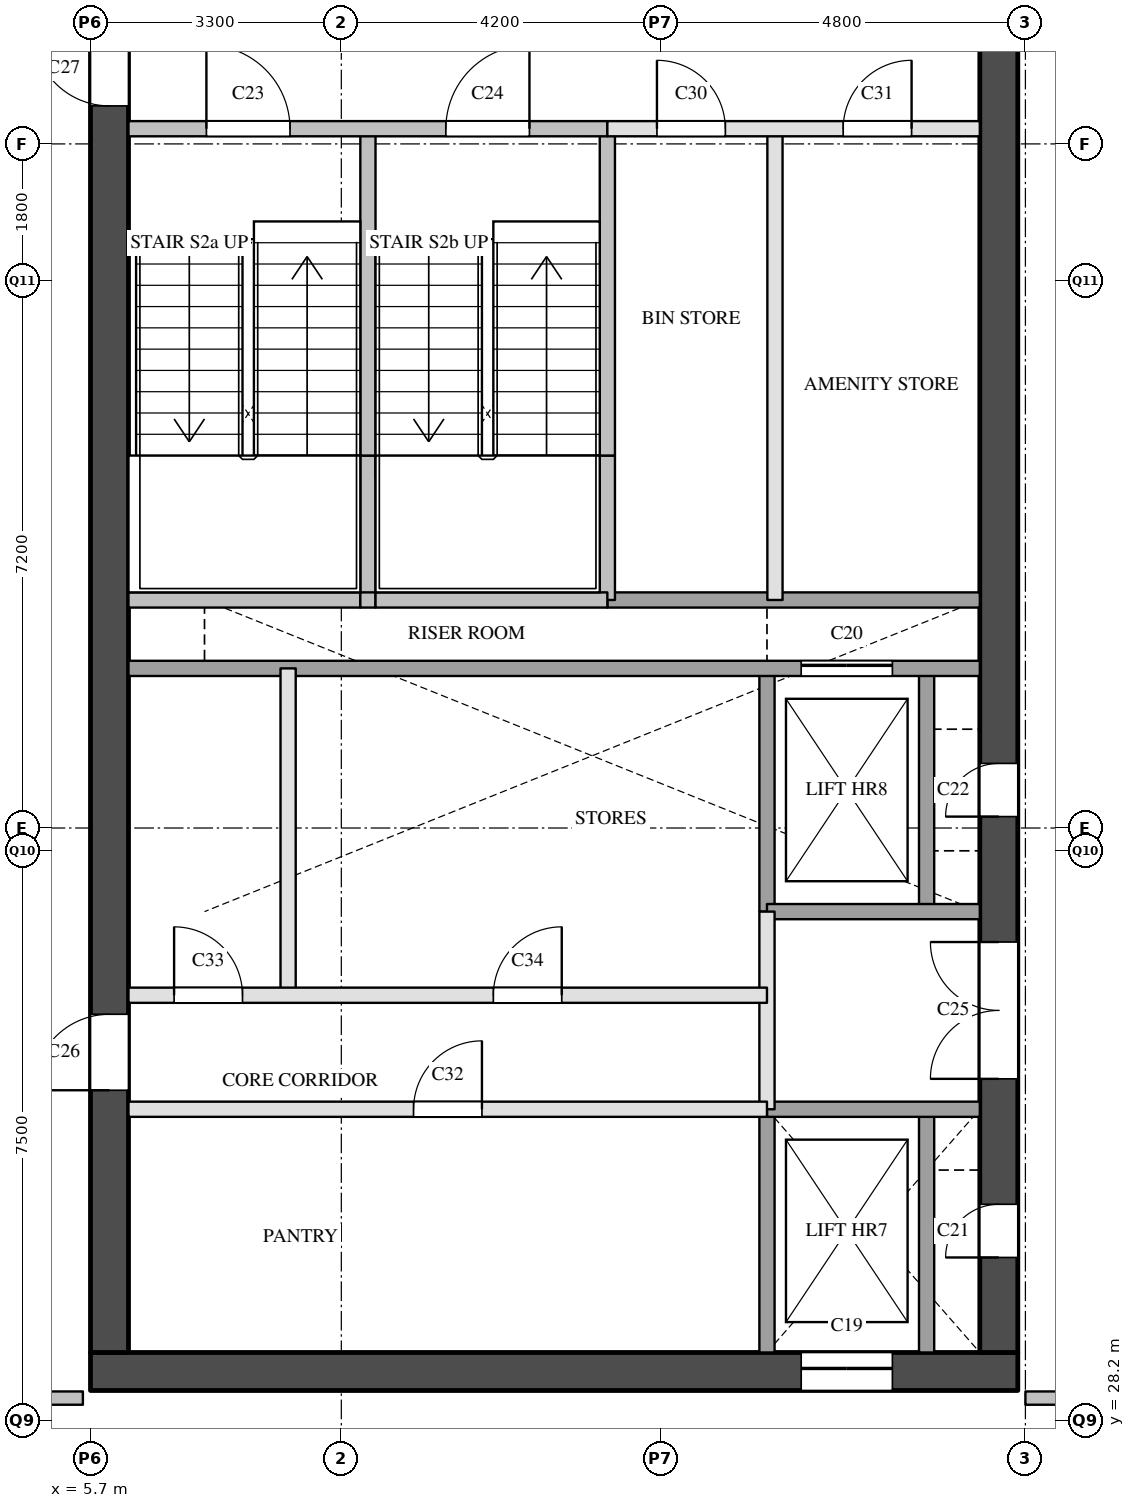
"""IFC4 building model, lengths in metres.
Left out: names, types, materials, properties, quantities, classifications, styles, units other than length and angle.
Written with IfcOpenShell. Run it as: python <this file> out.ifc"""

import sys

from ifc_helpers import new_model, si_unit, direction, frame, frame_2d, origin, place, context, subcontext, project, spatial, rectangle, extrude, element, fill, save


model = new_model("IFC4")
c1 = context("Model", 3, precision=1e-05, world=origin(), true_north=direction((0.0, 1.0)))
c2 = subcontext(c1, "Body", "Model", "MODEL_VIEW")
j1 = project(units=[si_unit("LENGTHUNIT", "METRE"), si_unit("PLANEANGLEUNIT", "RADIAN")], contexts=[c1])
p1 = place(None, origin())
s1 = spatial("IfcSite", under=j1, at=p1, CompositionType="ELEMENT")
p2 = place(p1, origin())
s2 = spatial("IfcBuilding", under=s1, at=p2, CompositionType="ELEMENT")
p3 = place(p2, frame((0.0, 0.0, 173.9)))
s3 = spatial("IfcBuildingStorey", under=s2, at=p3, CompositionType="ELEMENT", Elevation=173.9)
p4 = place(p3, frame((5.7, 28.85, 0.0), z_axis=(0.0, 0.0, 1.0), x_axis=(1.0, 0.0, 0.0)))
e1 = element("IfcWall", 1, at=p4, inside=s3, PredefinedType="SHEAR", context=c2, shape_type="SweptSolid", body=[
    extrude(rectangle(XDim=12.2, YDim=0.5, at=frame_2d((6.1, 0.0))), origin(), (0.0, 0.0, 1.0), 3.6),
])
p5 = place(p4, frame((9.35, 0.0, 0.0)))
e2 = element("IfcOpeningElement", 2, at=p5, cuts=e1, PredefinedType="OPENING", context=c2, shape_type="SweptSolid", body=[
    extrude(rectangle(XDim=1.2, YDim=2.1, at=frame_2d((0.6, 1.05))), frame((0.0, 0.26, 0.0), z_axis=(0.0, -1.0, 0.0), x_axis=(1.0, 0.0, 0.0)), (0.0, 0.0, 1.0), 0.52),
])
p6 = place(p3, frame((5.95, 29.1, 0.0), z_axis=(0.0, 0.0, 1.0), x_axis=(0.0, 1.0, 0.0)))
e3 = element("IfcWall", 3, at=p6, inside=s3, PredefinedType="SHEAR", context=c2, shape_type="SweptSolid", body=[
    extrude(rectangle(XDim=20.3, YDim=0.5, at=frame_2d((10.15, 0.0))), origin(), (0.0, 0.0, 1.0), 3.6),
])
p7 = place(p6, frame((3.45, 0.0, 0.0)))
e4 = element("IfcOpeningElement", 4, at=p7, cuts=e3, PredefinedType="OPENING", context=c2, shape_type="SweptSolid", body=[
    extrude(rectangle(XDim=1.0, YDim=2.1, at=frame_2d((0.5, 1.05))), frame((0.0, 0.26, 0.0), z_axis=(0.0, -1.0, 0.0), x_axis=(1.0, 0.0, 0.0)), (0.0, 0.0, 1.0), 0.52),
])
p8 = place(p6, frame((16.4, 0.0, 0.0)))
e5 = element("IfcOpeningElement", 5, at=p8, cuts=e3, PredefinedType="OPENING", context=c2, shape_type="SweptSolid", body=[
    extrude(rectangle(XDim=1.0, YDim=2.1, at=frame_2d((0.5, 1.05))), frame((0.0, 0.26, 0.0), z_axis=(0.0, -1.0, 0.0), x_axis=(1.0, 0.0, 0.0)), (0.0, 0.0, 1.0), 0.52),
])
p9 = place(p3, frame((17.65, 29.1, 0.0), z_axis=(0.0, 0.0, 1.0), x_axis=(0.0, 1.0, 0.0)))
e6 = element("IfcWall", 6, at=p9, inside=s3, PredefinedType="SHEAR", context=c2, shape_type="SweptSolid", body=[
    extrude(rectangle(XDim=20.3, YDim=0.5, at=frame_2d((10.15, 0.0))), origin(), (0.0, 0.0, 1.0), 3.6),
])
p10 = place(p9, frame((1.25, 0.0, 0.0)))
e7 = element("IfcOpeningElement", 7, at=p10, cuts=e6, PredefinedType="OPENING", context=c2, shape_type="SweptSolid", body=[
    extrude(rectangle(XDim=0.7, YDim=2.1, at=frame_2d((0.35, 1.05))), frame((0.0, 0.26, 0.0), z_axis=(0.0, -1.0, 0.0), x_axis=(1.0, 0.0, 0.0)), (0.0, 0.0, 1.0), 0.52),
])
p11 = place(p9, frame((7.05, 0.0, 0.0)))
e8 = element("IfcOpeningElement", 8, at=p11, cuts=e6, PredefinedType="OPENING", context=c2, shape_type="SweptSolid", body=[
    extrude(rectangle(XDim=0.7, YDim=2.1, at=frame_2d((0.35, 1.05))), frame((0.0, 0.26, 0.0), z_axis=(0.0, -1.0, 0.0), x_axis=(1.0, 0.0, 0.0)), (0.0, 0.0, 1.0), 0.52),
])
p12 = place(p9, frame((3.6, 0.0, 0.0)))
e9 = element("IfcOpeningElement", 9, at=p12, cuts=e6, PredefinedType="OPENING", context=c2, shape_type="SweptSolid", body=[
    extrude(rectangle(XDim=1.8, YDim=2.1, at=frame_2d((0.9, 1.05))), frame((0.0, 0.26, 0.0), z_axis=(0.0, -1.0, 0.0), x_axis=(1.0, 0.0, 0.0)), (0.0, 0.0, 1.0), 0.52),
])
p13 = place(p3, frame((8.3, 33.8, 0.0), z_axis=(0.0, 0.0, 1.0), x_axis=(0.0, 1.0, 0.0)))
e10 = element("IfcWall", 10, at=p13, inside=s3, PredefinedType="PARTITIONING", context=c2, shape_type="SweptSolid", body=[
    extrude(rectangle(XDim=4.3, YDim=0.2, at=frame_2d((2.15, 0.0))), origin(), (0.0, 0.0, 1.0), 3.6),
])
p14 = place(p3, frame((9.35, 39.0, 0.0), z_axis=(0.0, 0.0, 1.0), x_axis=(0.0, 1.0, 0.0)))
e11 = element("IfcWall", 11, at=p14, inside=s3, PredefinedType="SOLIDWALL", context=c2, shape_type="SweptSolid", body=[
    extrude(rectangle(XDim=1.9, YDim=0.2, at=frame_2d((0.95, 0.0))), origin(), (0.0, 0.0, 1.0), 3.6),
])
p15 = place(p3, frame((9.35, 40.9, 0.0), z_axis=(0.0, 0.0, 1.0), x_axis=(0.0, 1.0, 0.0)))
e12 = element("IfcWall", 12, at=p15, inside=s3, PredefinedType="SOLIDWALL", context=c2, shape_type="SweptSolid", body=[
    extrude(rectangle(XDim=4.3, YDim=0.2, at=frame_2d((2.15, 0.0))), origin(), (0.0, 0.0, 1.0), 3.6),
])
p16 = place(p3, frame((12.5, 39.0, 0.0), z_axis=(0.0, 0.0, 1.0), x_axis=(0.0, 1.0, 0.0)))
e13 = element("IfcWall", 13, at=p16, inside=s3, PredefinedType="SOLIDWALL", context=c2, shape_type="SweptSolid", body=[
    extrude(rectangle(XDim=1.9, YDim=0.2, at=frame_2d((0.95, 0.0))), origin(), (0.0, 0.0, 1.0), 3.6),
])
p17 = place(p3, frame((12.5, 40.9, 0.0), z_axis=(0.0, 0.0, 1.0), x_axis=(0.0, 1.0, 0.0)))
e14 = element("IfcWall", 14, at=p17, inside=s3, PredefinedType="SOLIDWALL", context=c2, shape_type="SweptSolid", body=[
    extrude(rectangle(XDim=4.3, YDim=0.2, at=frame_2d((2.15, 0.0))), origin(), (0.0, 0.0, 1.0), 3.6),
])
p18 = place(p3, frame((14.6, 32.3, 0.0), z_axis=(0.0, 0.0, 1.0), x_axis=(0.0, 1.0, 0.0)))
e15 = element("IfcWall", 15, at=p18, inside=s3, PredefinedType="PARTITIONING", context=c2, shape_type="SweptSolid", body=[
    extrude(rectangle(XDim=2.6, YDim=0.2, at=frame_2d((1.3, 0.0))), origin(), (0.0, 0.0, 1.0), 3.6),
])
p19 = place(p3, frame((14.6, 29.1, 0.0), z_axis=(0.0, 0.0, 1.0), x_axis=(0.0, 1.0, 0.0)))
e16 = element("IfcWall", 16, at=p19, inside=s3, PredefinedType="SOLIDWALL", context=c2, shape_type="SweptSolid", body=[
    extrude(rectangle(XDim=3.2, YDim=0.2, at=frame_2d((1.6, 0.0))), origin(), (0.0, 0.0, 1.0), 3.6),
])
p20 = place(p3, frame((14.6, 34.9, 0.0), z_axis=(0.0, 0.0, 1.0), x_axis=(0.0, 1.0, 0.0)))
e17 = element("IfcWall", 17, at=p20, inside=s3, PredefinedType="SOLIDWALL", context=c2, shape_type="SweptSolid", body=[
    extrude(rectangle(XDim=3.2, YDim=0.2, at=frame_2d((1.6, 0.0))), origin(), (0.0, 0.0, 1.0), 3.6),
])
p21 = place(p3, frame((14.705, 39.0, 0.0), z_axis=(0.0, 0.0, 1.0), x_axis=(0.0, 1.0, 0.0)))
e18 = element("IfcWall", 18, at=p21, inside=s3, PredefinedType="PARTITIONING", context=c2, shape_type="SweptSolid", body=[
    extrude(rectangle(XDim=6.2, YDim=0.2, at=frame_2d((3.1, 0.0))), origin(), (0.0, 0.0, 1.0), 3.6),
])
p22 = place(p3, frame((16.7, 29.1, 0.0), z_axis=(0.0, 0.0, 1.0), x_axis=(0.0, 1.0, 0.0)))
e19 = element("IfcWall", 19, at=p22, inside=s3, PredefinedType="SOLIDWALL", context=c2, shape_type="SweptSolid", body=[
    extrude(rectangle(XDim=3.2, YDim=0.2, at=frame_2d((1.6, 0.0))), origin(), (0.0, 0.0, 1.0), 3.6),
])
p23 = place(p3, frame((16.7, 34.9, 0.0), z_axis=(0.0, 0.0, 1.0), x_axis=(0.0, 1.0, 0.0)))
e20 = element("IfcWall", 20, at=p23, inside=s3, PredefinedType="SOLIDWALL", context=c2, shape_type="SweptSolid", body=[
    extrude(rectangle(XDim=3.2, YDim=0.2, at=frame_2d((1.6, 0.0))), origin(), (0.0, 0.0, 1.0), 3.6),
])
p24 = place(p3, frame((6.2, 32.3, 0.0), z_axis=(0.0, 0.0, 1.0), x_axis=(1.0, 0.0, 0.0)))
e21 = element("IfcWall", 21, at=p24, inside=s3, PredefinedType="PARTITIONING", context=c2, shape_type="SweptSolid", body=[
    extrude(rectangle(XDim=8.4, YDim=0.2, at=frame_2d((4.2, 0.0))), origin(), (0.0, 0.0, 1.0), 3.6),
])
p25 = place(p24, frame((3.75, 0.0, 0.0)))
e22 = element("IfcOpeningElement", 22, at=p25, cuts=e21, PredefinedType="OPENING", context=c2, shape_type="SweptSolid", body=[
    extrude(rectangle(XDim=0.9, YDim=2.1, at=frame_2d((0.45, 1.05))), frame((0.0, 0.11, 0.0), z_axis=(0.0, -1.0, 0.0), x_axis=(1.0, 0.0, 0.0)), (0.0, 0.0, 1.0), 0.22),
])
p26 = place(p3, frame((14.6, 32.3, 0.0), z_axis=(0.0, 0.0, 1.0), x_axis=(1.0, 0.0, 0.0)))
e23 = element("IfcWall", 23, at=p26, inside=s3, PredefinedType="SOLIDWALL", context=c2, shape_type="SweptSolid", body=[
    extrude(rectangle(XDim=2.8, YDim=0.2, at=frame_2d((1.4, 0.0))), origin(), (0.0, 0.0, 1.0), 3.6),
])
p27 = place(p3, frame((6.2, 33.8, 0.0), z_axis=(0.0, 0.0, 1.0), x_axis=(1.0, 0.0, 0.0)))
e24 = element("IfcWall", 24, at=p27, inside=s3, PredefinedType="PARTITIONING", context=c2, shape_type="SweptSolid", body=[
    extrude(rectangle(XDim=8.4, YDim=0.2, at=frame_2d((4.2, 0.0))), origin(), (0.0, 0.0, 1.0), 3.6),
])
p28 = place(p27, frame((0.6, 0.0, 0.0)))
e25 = element("IfcOpeningElement", 25, at=p28, cuts=e24, PredefinedType="OPENING", context=c2, shape_type="SweptSolid", body=[
    extrude(rectangle(XDim=0.9, YDim=2.1, at=frame_2d((0.45, 1.05))), frame((0.0, 0.11, 0.0), z_axis=(0.0, -1.0, 0.0), x_axis=(1.0, 0.0, 0.0)), (0.0, 0.0, 1.0), 0.22),
])
p29 = place(p27, frame((4.8, 0.0, 0.0)))
e26 = element("IfcOpeningElement", 26, at=p29, cuts=e24, PredefinedType="OPENING", context=c2, shape_type="SweptSolid", body=[
    extrude(rectangle(XDim=0.9, YDim=2.1, at=frame_2d((0.45, 1.05))), frame((0.0, 0.11, 0.0), z_axis=(0.0, -1.0, 0.0), x_axis=(1.0, 0.0, 0.0)), (0.0, 0.0, 1.0), 0.22),
])
p30 = place(p3, frame((14.6, 34.9, 0.0), z_axis=(0.0, 0.0, 1.0), x_axis=(1.0, 0.0, 0.0)))
e27 = element("IfcWall", 27, at=p30, inside=s3, PredefinedType="SOLIDWALL", context=c2, shape_type="SweptSolid", body=[
    extrude(rectangle(XDim=2.8, YDim=0.2, at=frame_2d((1.4, 0.0))), origin(), (0.0, 0.0, 1.0), 3.6),
])
p31 = place(p3, frame((6.2, 38.1, 0.0), z_axis=(0.0, 0.0, 1.0), x_axis=(1.0, 0.0, 0.0)))
e28 = element("IfcWall", 28, at=p31, inside=s3, PredefinedType="SOLIDWALL", context=c2, shape_type="SweptSolid", body=[
    extrude(rectangle(XDim=11.2, YDim=0.2, at=frame_2d((5.6, 0.0))), origin(), (0.0, 0.0, 1.0), 3.6),
])
p32 = place(p31, frame((8.85, 0.0, 0.0)))
e29 = element("IfcOpeningElement", 29, at=p32, cuts=e28, PredefinedType="OPENING", context=c2, shape_type="SweptSolid", body=[
    extrude(rectangle(XDim=1.2, YDim=2.1, at=frame_2d((0.6, 1.05))), frame((0.0, 0.11, 0.0), z_axis=(0.0, -1.0, 0.0), x_axis=(1.0, 0.0, 0.0)), (0.0, 0.0, 1.0), 0.22),
])
p33 = place(p3, frame((12.5, 39.0, 0.0), z_axis=(0.0, 0.0, 1.0), x_axis=(1.0, 0.0, 0.0)))
e30 = element("IfcWall", 30, at=p33, inside=s3, PredefinedType="SOLIDWALL", context=c2, shape_type="SweptSolid", body=[
    extrude(rectangle(XDim=4.9, YDim=0.2, at=frame_2d((2.45, 0.0))), origin(), (0.0, 0.0, 1.0), 3.6),
])
p34 = place(p3, frame((6.2, 39.0, 0.0), z_axis=(0.0, 0.0, 1.0), x_axis=(1.0, 0.0, 0.0)))
e31 = element("IfcWall", 31, at=p34, inside=s3, PredefinedType="SOLIDWALL", context=c2, shape_type="SweptSolid", body=[
    extrude(rectangle(XDim=3.05, YDim=0.2, at=frame_2d((1.525, 0.0))), origin(), (0.0, 0.0, 1.0), 3.6),
])
p35 = place(p3, frame((9.25, 39.0, 0.0), z_axis=(0.0, 0.0, 1.0), x_axis=(1.0, 0.0, 0.0)))
e32 = element("IfcWall", 32, at=p35, inside=s3, PredefinedType="SOLIDWALL", context=c2, shape_type="SweptSolid", body=[
    extrude(rectangle(XDim=0.2, YDim=0.2, at=frame_2d((0.1, 0.0))), origin(), (0.0, 0.0, 1.0), 3.6),
])
p36 = place(p3, frame((9.45, 39.0, 0.0), z_axis=(0.0, 0.0, 1.0), x_axis=(1.0, 0.0, 0.0)))
e33 = element("IfcWall", 33, at=p36, inside=s3, PredefinedType="SOLIDWALL", context=c2, shape_type="SweptSolid", body=[
    extrude(rectangle(XDim=3.05, YDim=0.2, at=frame_2d((1.525, 0.0))), origin(), (0.0, 0.0, 1.0), 3.6),
])
p37 = place(p3, frame((12.5, 45.2, 0.0), z_axis=(0.0, 0.0, 1.0), x_axis=(1.0, 0.0, 0.0)))
e34 = element("IfcWall", 34, at=p37, inside=s3, PredefinedType="PARTITIONING", context=c2, shape_type="SweptSolid", body=[
    extrude(rectangle(XDim=4.9, YDim=0.2, at=frame_2d((2.45, 0.0))), origin(), (0.0, 0.0, 1.0), 3.6),
])
p38 = place(p37, frame((0.653, 0.0, 0.0)))
e35 = element("IfcOpeningElement", 35, at=p38, cuts=e34, PredefinedType="OPENING", context=c2, shape_type="SweptSolid", body=[
    extrude(rectangle(XDim=0.9, YDim=2.1, at=frame_2d((0.45, 1.05))), frame((0.0, 0.11, 0.0), z_axis=(0.0, -1.0, 0.0), x_axis=(1.0, 0.0, 0.0)), (0.0, 0.0, 1.0), 0.22),
])
p39 = place(p37, frame((3.103, 0.0, 0.0)))
e36 = element("IfcOpeningElement", 36, at=p39, cuts=e34, PredefinedType="OPENING", context=c2, shape_type="SweptSolid", body=[
    extrude(rectangle(XDim=0.9, YDim=2.1, at=frame_2d((0.45, 1.05))), frame((0.0, 0.11, 0.0), z_axis=(0.0, -1.0, 0.0), x_axis=(1.0, 0.0, 0.0)), (0.0, 0.0, 1.0), 0.22),
])
p40 = place(p3, frame((6.2, 45.2, 0.0), z_axis=(0.0, 0.0, 1.0), x_axis=(1.0, 0.0, 0.0)))
e37 = element("IfcWall", 37, at=p40, inside=s3, PredefinedType="SOLIDWALL", context=c2, shape_type="SweptSolid", body=[
    extrude(rectangle(XDim=6.3, YDim=0.2, at=frame_2d((3.15, 0.0))), origin(), (0.0, 0.0, 1.0), 3.6),
])
p41 = place(p40, frame((1.025, 0.0, 0.0)))
e38 = element("IfcOpeningElement", 38, at=p41, cuts=e37, PredefinedType="OPENING", context=c2, shape_type="SweptSolid", body=[
    extrude(rectangle(XDim=1.1, YDim=2.1, at=frame_2d((0.55, 1.05))), frame((0.0, 0.11, 0.0), z_axis=(0.0, -1.0, 0.0), x_axis=(1.0, 0.0, 0.0)), (0.0, 0.0, 1.0), 0.22),
])
p42 = place(p40, frame((4.175, 0.0, 0.0)))
e39 = element("IfcOpeningElement", 39, at=p42, cuts=e37, PredefinedType="OPENING", context=c2, shape_type="SweptSolid", body=[
    extrude(rectangle(XDim=1.1, YDim=2.1, at=frame_2d((0.55, 1.05))), frame((0.0, 0.11, 0.0), z_axis=(0.0, -1.0, 0.0), x_axis=(1.0, 0.0, 0.0)), (0.0, 0.0, 1.0), 0.22),
])
for number, where, z_axis, x_axis in (
    (40, (4.1, 28.5, 0.0), (0.0, 0.0, 1.0), (1.0, 0.0, 0.0)),
    (41, (18.0, 28.5, 0.0), (0.0, 0.0, 1.0), (1.0, 0.0, 0.0)),
):
    element("IfcWall", number, at=place(p3, frame(where, z_axis=z_axis, x_axis=x_axis)), inside=s3, PredefinedType="PARTITIONING", context=c2, shape_type="SweptSolid", body=[
        extrude(rectangle(XDim=1.5, YDim=0.175, at=frame_2d((0.75, 0.0))), origin(), (0.0, 0.0, 1.0), 3.6),
    ])
p43 = place(p5, origin())
e42 = element("IfcDoor", 42, at=p43, inside=s3, OperationType="SLIDING_TO_LEFT", PredefinedType="DOOR", context=c2, shape_type="SweptSolid", body=[
    extrude(rectangle(XDim=1.2, YDim=2.1, at=frame_2d((0.6, 1.05))), frame((0.0, 0.025, 0.0), z_axis=(0.0, -1.0, 0.0), x_axis=(1.0, 0.0, 0.0)), (0.0, 0.0, 1.0), 0.05),
])
fill(e2, e42)
p44 = place(p32, origin())
e43 = element("IfcDoor", 43, at=p44, inside=s3, OperationType="SLIDING_TO_LEFT", PredefinedType="DOOR", context=c2, shape_type="SweptSolid", body=[
    extrude(rectangle(XDim=1.2, YDim=2.1, at=frame_2d((0.6, 1.05))), frame((0.0, 0.025, 0.0), z_axis=(0.0, -1.0, 0.0), x_axis=(1.0, 0.0, 0.0)), (0.0, 0.0, 1.0), 0.05),
])
fill(e29, e43)
p45 = place(p10, origin())
e44 = element("IfcDoor", 44, at=p45, inside=s3, OperationType="SINGLE_SWING_LEFT", PredefinedType="DOOR", context=c2, shape_type="SweptSolid", body=[
    extrude(rectangle(XDim=0.7, YDim=2.1, at=frame_2d((0.35, 1.05))), frame((0.0, 0.025, 0.0), z_axis=(0.0, -1.0, 0.0), x_axis=(1.0, 0.0, 0.0)), (0.0, 0.0, 1.0), 0.05),
])
fill(e7, e44)
p46 = place(p11, origin())
e45 = element("IfcDoor", 45, at=p46, inside=s3, OperationType="SINGLE_SWING_LEFT", PredefinedType="DOOR", context=c2, shape_type="SweptSolid", body=[
    extrude(rectangle(XDim=0.7, YDim=2.1, at=frame_2d((0.35, 1.05))), frame((0.0, 0.025, 0.0), z_axis=(0.0, -1.0, 0.0), x_axis=(1.0, 0.0, 0.0)), (0.0, 0.0, 1.0), 0.05),
])
fill(e8, e45)
p47 = place(p41, origin())
e46 = element("IfcDoor", 46, at=p47, inside=s3, OperationType="SINGLE_SWING_LEFT", PredefinedType="DOOR", context=c2, shape_type="SweptSolid", body=[
    extrude(rectangle(XDim=1.1, YDim=2.1, at=frame_2d((0.55, 1.05))), frame((0.0, 0.025, 0.0), z_axis=(0.0, -1.0, 0.0), x_axis=(1.0, 0.0, 0.0)), (0.0, 0.0, 1.0), 0.05),
])
fill(e38, e46)
p48 = place(p42, origin())
e47 = element("IfcDoor", 47, at=p48, inside=s3, OperationType="SINGLE_SWING_RIGHT", PredefinedType="DOOR", context=c2, shape_type="SweptSolid", body=[
    extrude(rectangle(XDim=1.1, YDim=2.1, at=frame_2d((0.55, 1.05))), frame((0.0, 0.025, 0.0), z_axis=(0.0, -1.0, 0.0), x_axis=(1.0, 0.0, 0.0)), (0.0, 0.0, 1.0), 0.05),
])
fill(e39, e47)
p49 = place(p12, origin())
e48 = element("IfcDoor", 48, at=p49, inside=s3, OperationType="DOUBLE_DOOR_SINGLE_SWING", PredefinedType="DOOR", context=c2, shape_type="SweptSolid", body=[
    extrude(rectangle(XDim=1.8, YDim=2.1, at=frame_2d((0.9, 1.05))), frame((0.0, 0.025, 0.0), z_axis=(0.0, -1.0, 0.0), x_axis=(1.0, 0.0, 0.0)), (0.0, 0.0, 1.0), 0.05),
])
fill(e9, e48)
p50 = place(p7, origin())
e49 = element("IfcDoor", 49, at=p50, inside=s3, OperationType="SINGLE_SWING_LEFT", PredefinedType="DOOR", context=c2, shape_type="SweptSolid", body=[
    extrude(rectangle(XDim=1.0, YDim=2.1, at=frame_2d((0.5, 1.05))), frame((0.0, 0.025, 0.0), z_axis=(0.0, -1.0, 0.0), x_axis=(1.0, 0.0, 0.0)), (0.0, 0.0, 1.0), 0.05),
])
fill(e4, e49)
p51 = place(p8, origin())
e50 = element("IfcDoor", 50, at=p51, inside=s3, OperationType="SINGLE_SWING_RIGHT", PredefinedType="DOOR", context=c2, shape_type="SweptSolid", body=[
    extrude(rectangle(XDim=1.0, YDim=2.1, at=frame_2d((0.5, 1.05))), frame((0.0, 0.025, 0.0), z_axis=(0.0, -1.0, 0.0), x_axis=(1.0, 0.0, 0.0)), (0.0, 0.0, 1.0), 0.05),
])
fill(e5, e50)
p52 = place(p38, origin())
e51 = element("IfcDoor", 51, at=p52, inside=s3, OperationType="SINGLE_SWING_LEFT", PredefinedType="DOOR", context=c2, shape_type="SweptSolid", body=[
    extrude(rectangle(XDim=0.9, YDim=2.1, at=frame_2d((0.45, 1.05))), frame((0.0, 0.025, 0.0), z_axis=(0.0, -1.0, 0.0), x_axis=(1.0, 0.0, 0.0)), (0.0, 0.0, 1.0), 0.05),
])
fill(e35, e51)
p53 = place(p39, origin())
e52 = element("IfcDoor", 52, at=p53, inside=s3, OperationType="SINGLE_SWING_RIGHT", PredefinedType="DOOR", context=c2, shape_type="SweptSolid", body=[
    extrude(rectangle(XDim=0.9, YDim=2.1, at=frame_2d((0.45, 1.05))), frame((0.0, 0.025, 0.0), z_axis=(0.0, -1.0, 0.0), x_axis=(1.0, 0.0, 0.0)), (0.0, 0.0, 1.0), 0.05),
])
fill(e36, e52)
p54 = place(p25, origin())
e53 = element("IfcDoor", 53, at=p54, inside=s3, OperationType="SINGLE_SWING_RIGHT", PredefinedType="DOOR", context=c2, shape_type="SweptSolid", body=[
    extrude(rectangle(XDim=0.9, YDim=2.1, at=frame_2d((0.45, 1.05))), frame((0.0, 0.025, 0.0), z_axis=(0.0, -1.0, 0.0), x_axis=(1.0, 0.0, 0.0)), (0.0, 0.0, 1.0), 0.05),
])
fill(e22, e53)
p55 = place(p28, origin())
e54 = element("IfcDoor", 54, at=p55, inside=s3, OperationType="SINGLE_SWING_LEFT", PredefinedType="DOOR", context=c2, shape_type="SweptSolid", body=[
    extrude(rectangle(XDim=0.9, YDim=2.1, at=frame_2d((0.45, 1.05))), frame((0.0, 0.025, 0.0), z_axis=(0.0, -1.0, 0.0), x_axis=(1.0, 0.0, 0.0)), (0.0, 0.0, 1.0), 0.05),
])
fill(e25, e54)
p56 = place(p29, origin())
e55 = element("IfcDoor", 55, at=p56, inside=s3, OperationType="SINGLE_SWING_RIGHT", PredefinedType="DOOR", context=c2, shape_type="SweptSolid", body=[
    extrude(rectangle(XDim=0.9, YDim=2.1, at=frame_2d((0.45, 1.05))), frame((0.0, 0.025, 0.0), z_axis=(0.0, -1.0, 0.0), x_axis=(1.0, 0.0, 0.0)), (0.0, 0.0, 1.0), 0.05),
])
fill(e26, e55)
save(model, sys.argv[1])
